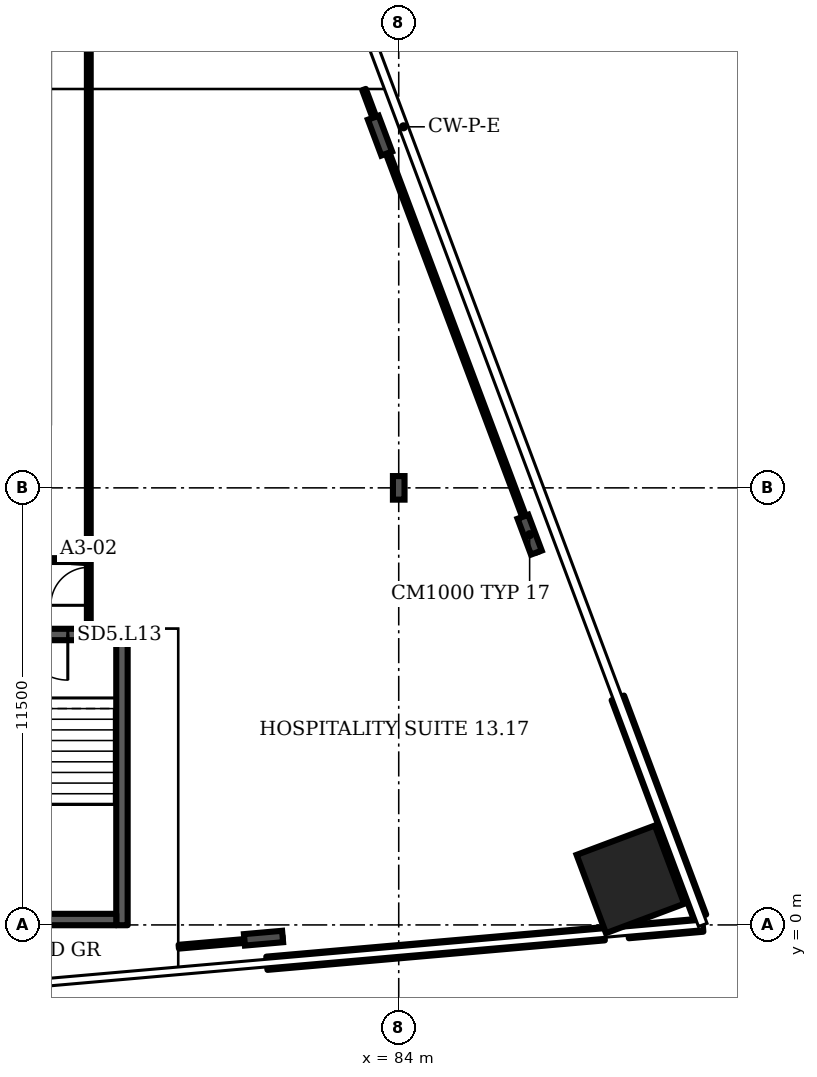
"""IFC4 building model, lengths in metres.
Left out: names, types, materials, properties, quantities, classifications, styles, units other than length and angle.
Written with IfcOpenShell. Run it as: python <this file> out.ifc"""

import sys

from ifc_helpers import new_model, si_unit, direction, frame, frame_2d, origin, origin_2d, place, context, subcontext, project, spatial, rectangle, i_section, extrude, element, fill, save


model = new_model("IFC4")
c1 = context("Model", 3, precision=1e-05, world=origin(), true_north=direction((0.0, 1.0)))
c2 = subcontext(c1, "Body", "Model", "MODEL_VIEW")
j1 = project(units=[si_unit("LENGTHUNIT", "METRE"), si_unit("PLANEANGLEUNIT", "RADIAN")], contexts=[c1])
p1 = place(None, origin())
s1 = spatial("IfcSite", under=j1, at=p1, CompositionType="ELEMENT")
p2 = place(p1, origin())
s2 = spatial("IfcBuilding", under=s1, at=p2, CompositionType="ELEMENT")
p3 = place(p2, frame((0.0, 0.0, 66.7)))
s3 = spatial("IfcBuildingStorey", under=s2, at=p3, CompositionType="ELEMENT", Elevation=66.7)
p4 = place(p3, frame((90.096, 1.2, 0.0), z_axis=(0.0, 0.0, 1.0), x_axis=(-0.351123, 0.936328, 0.0)))
e1 = element("IfcColumn", 1, at=p4, inside=s3, PredefinedType="COLUMN", context=c2, shape_type="SweptSolid", body=[
    extrude(rectangle(XDim=2.2, YDim=2.2, at=origin_2d()), origin(), (0.0, 0.0, 1.0), 3.6),
])
for number, where, z_axis, x_axis in (
    (2, (80.442, -0.349, 0.0), (0.0, 0.0, 1.0), (0.087, -0.996, 0.0)),
    (3, (87.445, 10.268, 0.0), (0.0, 0.0, 1.0), (0.936, 0.351, 0.0)),
    (4, (83.507, 20.768, 0.0), (0.0, 0.0, 1.0), (0.936, 0.351, 0.0)),
):
    element("IfcColumn", number, at=place(p3, frame(where, z_axis=z_axis, x_axis=x_axis)), inside=s3, PredefinedType="COLUMN", context=c2, shape_type="SweptSolid", body=[
        extrude(i_section(OverallWidth=0.302, OverallDepth=1.008, WebThickness=0.021, FlangeThickness=0.04, FilletRadius=0.03, at=origin_2d()), origin(), (0.0, 0.0, 1.0), 3.6),
    ])
p5 = place(p3, frame((84.0, 11.5, 0.0), z_axis=(0.0, 0.0, 1.0), x_axis=(1.0, 0.0, 0.0)))
e5 = element("IfcColumn", 5, at=p5, inside=s3, PredefinedType="COLUMN", context=c2, shape_type="SweptSolid", body=[
    extrude(i_section(OverallWidth=0.305, OverallDepth=0.62, WebThickness=0.021, FlangeThickness=0.04, FilletRadius=0.027, at=origin_2d()), origin(), (0.0, 0.0, 1.0), 3.6),
])
p6 = place(p3, frame((80.53, -1.009, 0.0), z_axis=(0.0, 0.0, 1.0), x_axis=(0.996198, 0.087169, 0.0)))
e6 = element("IfcWall", 6, at=p6, inside=s3, PredefinedType="SOLIDWALL", context=c2, shape_type="SweptSolid", body=[
    extrude(rectangle(XDim=8.912, YDim=0.35, at=frame_2d((4.456, 0.0))), origin(), (0.0, 0.0, 1.0), 1.0),
])
p7 = place(p3, frame((90.039, -0.177, 0.0), z_axis=(0.0, 0.0, 1.0), x_axis=(0.996193, 0.08717, 0.0)))
e7 = element("IfcWall", 7, at=p7, inside=s3, PredefinedType="SOLIDWALL", context=c2, shape_type="SweptSolid", body=[
    extrude(rectangle(XDim=1.969, YDim=0.35, at=frame_2d((0.984, 0.0))), origin(), (0.0, 0.0, 1.0), 1.0),
])
p8 = place(p3, frame((91.926, 0.211, 0.0), z_axis=(0.0, 0.0, 1.0), x_axis=(-0.351118, 0.936328, 0.0)))
e8 = element("IfcWall", 8, at=p8, inside=s3, PredefinedType="SOLIDWALL", context=c2, shape_type="SweptSolid", body=[
    extrude(rectangle(XDim=6.154, YDim=0.35, at=frame_2d((3.077, 0.0))), origin(), (0.0, 0.0, 1.0), 1.0),
])
p9 = place(p3, frame((72.518, 7.642, 0.0), z_axis=(0.0, 0.0, 1.0), x_axis=(1.0, 0.0, 0.0)))
e9 = element("IfcWall", 9, at=p9, inside=s3, PredefinedType="SHEAR", context=c2, shape_type="SweptSolid", body=[
    extrude(rectangle(XDim=4.35, YDim=0.3, at=frame_2d((2.175, 0.0))), origin(), (0.0, 0.0, 1.0), 3.2),
])
p10 = place(p9, frame((1.575, 0.0, 0.0)))
e10 = element("IfcOpeningElement", 10, at=p10, cuts=e9, PredefinedType="OPENING", context=c2, shape_type="SweptSolid", body=[
    extrude(rectangle(XDim=1.2, YDim=2.1, at=frame_2d((0.6, 1.05))), frame((0.0, 0.16, 0.0), z_axis=(0.0, -1.0, 0.0), x_axis=(1.0, 0.0, 0.0)), (0.0, 0.0, 1.0), 0.32),
])
p11 = place(p3, frame((65.91, 9.6, 0.0), z_axis=(0.0, 0.0, 1.0), x_axis=(1.0, 0.0, 0.0)))
e11 = element("IfcWall", 11, at=p11, inside=s3, PredefinedType="PARTITIONING", context=c2, shape_type="SweptSolid", body=[
    extrude(rectangle(XDim=9.485, YDim=0.1, at=frame_2d((4.743, 0.0))), origin(), (0.0, 0.0, 1.0), 3.2),
])
p12 = place(p3, frame((75.43, 10.045, 0.0), z_axis=(0.0, 0.0, 1.0), x_axis=(1.0, 0.0, 0.0)))
e12 = element("IfcWall", 12, at=p12, inside=s3, PredefinedType="PARTITIONING", context=c2, shape_type="SweptSolid", body=[
    extrude(rectangle(XDim=0.16, YDim=0.1, at=frame_2d((0.08, 0.0))), origin(), (0.0, 0.0, 1.0), 3.2),
])
p13 = place(p3, frame((75.725, 9.575, 0.0), z_axis=(0.0, 0.0, 1.0), x_axis=(-0.99817, 0.06054, 0.0)))
e13 = element("IfcWall", 13, at=p13, inside=s3, PredefinedType="PARTITIONING", context=c2, shape_type="SweptSolid", body=[
    extrude(rectangle(XDim=0.331, YDim=0.1, at=frame_2d((0.165, 0.0))), origin(), (0.0, 0.0, 1.0), 3.2),
])
p14 = place(p3, frame((75.725, 9.575, 0.0), z_axis=(0.0, 0.0, 1.0), x_axis=(0.0, 1.0, 0.0)))
e14 = element("IfcWall", 14, at=p14, inside=s3, PredefinedType="PARTITIONING", context=c2, shape_type="SweptSolid", body=[
    extrude(rectangle(XDim=0.45, YDim=0.1, at=frame_2d((0.225, 0.0))), origin(), (0.0, 0.0, 1.0), 3.2),
])
p15 = place(p3, frame((75.845, 7.812, 0.0), z_axis=(0.0, 0.0, 1.0), x_axis=(0.0, 1.0, 0.0)))
e15 = element("IfcWall", 15, at=p15, inside=s3, PredefinedType="PARTITIONING", context=c2, shape_type="SweptSolid", body=[
    extrude(rectangle(XDim=15.513, YDim=0.1, at=frame_2d((7.756, 0.0))), origin(), (0.0, 0.0, 1.0), 3.2),
])
p16 = place(p15, frame((0.598, 0.0, 0.0)))
e16 = element("IfcOpeningElement", 16, at=p16, cuts=e15, PredefinedType="OPENING", context=c2, shape_type="SweptSolid", body=[
    extrude(rectangle(XDim=1.0, YDim=2.1, at=frame_2d((0.5, 1.05))), frame((0.0, 0.06, 0.0), z_axis=(0.0, -1.0, 0.0), x_axis=(1.0, 0.0, 0.0)), (0.0, 0.0, 1.0), 0.12),
])
p17 = place(p3, frame((78.212, -0.573, 0.0), z_axis=(0.0, 0.0, 1.0), x_axis=(0.996224, 0.086779, 0.0)))
e17 = element("IfcWall", 17, at=p17, inside=s3, PredefinedType="PARTITIONING", context=c2, shape_type="SweptSolid", body=[
    extrude(rectangle(XDim=2.743, YDim=0.1, at=frame_2d((1.372, 0.0))), origin(), (0.0, 0.0, 1.0), 2.58),
])
p18 = place(p3, frame((83.71, 20.31, 0.0), z_axis=(0.0, 0.0, 1.0), x_axis=(-0.349322, 0.937005, 0.0)))
e18 = element("IfcWall", 18, at=p18, inside=s3, PredefinedType="PARTITIONING", context=c2, shape_type="SweptSolid", body=[
    extrude(rectangle(XDim=1.782, YDim=0.1, at=frame_2d((0.891, 0.0))), origin(), (0.0, 0.0, 1.0), 2.58),
])
p19 = place(p3, frame((87.65, 9.81, 0.0), z_axis=(0.0, 0.0, 1.0), x_axis=(-0.351395, 0.936227, 0.0)))
e19 = element("IfcWall", 19, at=p19, inside=s3, PredefinedType="PARTITIONING", context=c2, shape_type="SweptSolid", body=[
    extrude(rectangle(XDim=11.226, YDim=0.1, at=frame_2d((5.613, 0.0))), origin(), (0.0, 0.0, 1.0), 2.58),
])
p20 = place(p3, frame((76.718, -0.008, 0.0), z_axis=(0.0, 0.0, 1.0), x_axis=(0.0, 1.0, 0.0)))
e20 = element("IfcWall", 20, at=p20, inside=s3, PredefinedType="SHEAR", context=c2, shape_type="SweptSolid", body=[
    extrude(rectangle(XDim=7.5, YDim=0.3, at=frame_2d((3.75, 0.0))), origin(), (0.0, 0.0, 1.0), 3.2),
])
p21 = place(p3, frame((72.817, 0.142, 0.0), z_axis=(0.0, 0.0, 1.0), x_axis=(1.0, 0.0, 0.0)))
e21 = element("IfcWall", 21, at=p21, inside=s3, PredefinedType="SHEAR", context=c2, shape_type="SweptSolid", body=[
    extrude(rectangle(XDim=3.75, YDim=0.3, at=frame_2d((1.875, 0.0))), origin(), (0.0, 0.0, 1.0), 3.2),
])
p22 = place(p10, origin())
e22 = element("IfcDoor", 22, at=p22, inside=s3, OperationType="SINGLE_SWING_RIGHT", PredefinedType="DOOR", context=c2, shape_type="SweptSolid", body=[
    extrude(rectangle(XDim=1.2, YDim=2.1, at=frame_2d((0.6, 1.05))), frame((0.0, 0.025, 0.0), z_axis=(0.0, -1.0, 0.0), x_axis=(1.0, 0.0, 0.0)), (0.0, 0.0, 1.0), 0.05),
])
fill(e10, e22)
p23 = place(p16, origin())
e23 = element("IfcDoor", 23, at=p23, inside=s3, OperationType="SINGLE_SWING_LEFT", PredefinedType="DOOR", context=c2, shape_type="SweptSolid", body=[
    extrude(rectangle(XDim=1.0, YDim=2.1, at=frame_2d((0.5, 1.05))), frame((0.0, 0.025, 0.0), z_axis=(0.0, -1.0, 0.0), x_axis=(1.0, 0.0, 0.0)), (0.0, 0.0, 1.0), 0.05),
])
fill(e16, e23)
save(model, sys.argv[1])
